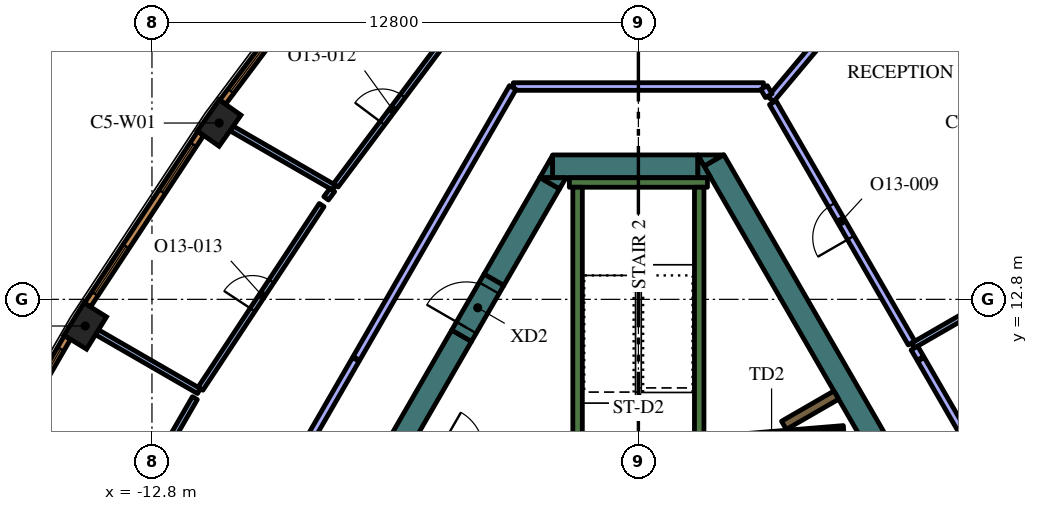
"""IFC4 building model, lengths in metres.
Left out: names, types, materials, properties, quantities, classifications, styles, units other than length and angle.
Written with IfcOpenShell. Run it as: python <this file> out.ifc"""

import sys

from ifc_helpers import new_model, si_unit, direction, frame, frame_2d, origin, origin_2d, place, context, subcontext, project, spatial, polyline, rectangle, outline, extrude, element, fill, save


model = new_model("IFC4")
c1 = context("Model", 3, precision=1e-05, world=origin(), true_north=direction((0.0, 1.0)))
c2 = subcontext(c1, "Body", "Model", "MODEL_VIEW")
j1 = project(units=[si_unit("LENGTHUNIT", "METRE"), si_unit("PLANEANGLEUNIT", "RADIAN")], contexts=[c1])
p1 = place(None, origin())
s1 = spatial("IfcSite", under=j1, at=p1, CompositionType="ELEMENT")
p2 = place(p1, origin())
s2 = spatial("IfcBuilding", under=s1, at=p2, CompositionType="ELEMENT")
p3 = place(p2, frame((0.0, 0.0, 292.2)))
s3 = spatial("IfcBuildingStorey", under=s2, at=p3, CompositionType="ELEMENT", Elevation=292.2)
for number, where, z_axis, x_axis in (
    (1, (-11.032, 17.44, 0.0), (0.0, 0.0, 1.0), (-0.575, -0.818, 0.0)),
    (2, (-14.556, 12.098, 0.0), (0.0, 0.0, 1.0), (-0.526, -0.851, 0.0)),
):
    element("IfcColumn", number, at=place(p3, frame(where, z_axis=z_axis, x_axis=x_axis)), inside=s3, PredefinedType="COLUMN", context=c2, shape_type="SweptSolid", body=[
        extrude(rectangle(XDim=1.0, YDim=0.7, at=origin_2d()), origin(), (0.0, 0.0, 1.0), 4.2),
    ])
p4 = place(p3, frame((1.989, 16.456, 0.0), z_axis=(0.0, 0.0, 1.0), x_axis=(0.49999102663, -0.8660305845, 0.0)))
e3 = element("IfcWall", 3, at=p4, inside=s3, PredefinedType="SOLIDWALL", context=c2, shape_type="SweptSolid", body=[
    extrude(rectangle(XDim=12.406, YDim=0.6, at=frame_2d((6.203, 0.0))), origin(), (0.0, 0.0, 1.0), 4.2),
])
p5 = place(p3, origin())
e4 = element("IfcWall", 4, at=p5, inside=s3, PredefinedType="SOLIDWALL", context=c2, shape_type="SweptSolid", body=[
    extrude(outline(polyline([(1.559, 16.6), (2.235, 16.6), (1.728, 16.307), (1.559, 16.6)])), origin(), (0.0, 0.0, 1.0), 4.2),
])
p6 = place(p3, frame((-2.258, 16.3, 0.0), z_axis=(0.0, 0.0, 1.0), x_axis=(1.0, 0.0, 0.0)))
e5 = element("IfcWall", 5, at=p6, inside=s3, PredefinedType="SOLIDWALL", context=c2, shape_type="SweptSolid", body=[
    extrude(rectangle(XDim=3.823, YDim=0.6, at=frame_2d((1.912, 0.0))), origin(), (0.0, 0.0, 1.0), 4.2),
])
e6 = element("IfcWall", 6, at=p5, inside=s3, PredefinedType="SOLIDWALL", context=c2, shape_type="SweptSolid", body=[
    extrude(outline(polyline([(1.905, 16.0), (1.567, 16.0), (1.567, 16.585), (1.905, 16.0)])), origin(), (0.0, 0.0, 1.0), 4.2),
])
e7 = element("IfcWall", 7, at=p5, inside=s3, PredefinedType="SOLIDWALL", context=c2, shape_type="SweptSolid", body=[
    extrude(outline(polyline([(-2.598, 16.0), (-2.26, 16.585), (-2.26, 16.0), (-2.598, 16.0)])), origin(), (0.0, 0.0, 1.0), 4.2),
])
p7 = place(p3, frame((-2.335, 15.855, 0.0), z_axis=(0.0, 0.0, 1.0), x_axis=(-0.499960127962, -0.866048422692, 0.0)))
e8 = element("IfcWall", 8, at=p7, inside=s3, PredefinedType="SOLIDWALL", context=c2, shape_type="SweptSolid", body=[
    extrude(rectangle(XDim=2.934, YDim=0.6, at=frame_2d((1.467, 0.0))), origin(), (0.0, 0.0, 1.0), 4.2),
])
e9 = element("IfcWall", 9, at=p5, inside=s3, PredefinedType="SOLIDWALL", context=c2, shape_type="SweptSolid", body=[
    extrude(outline(polyline([(-1.905, 16.0), (-2.074, 15.707), (-2.581, 16.0), (-1.905, 16.0)])), origin(), (0.0, 0.0, 1.0), 4.2),
])
e10 = element("IfcWall", 10, at=p5, inside=s3, PredefinedType="SOLIDWALL", context=c2, shape_type="SweptSolid", body=[
    extrude(outline(polyline([(-15.502, -6.35), (-4.912, 11.992), (-4.393, 11.692), (-10.815, 0.569), (-10.84, 0.583), (-10.84, 0.583), (-10.84, 0.583), (-10.965, 0.367), (-10.965, 0.367), (-10.965, 0.367), (-10.94, 0.352), (-11.033, 0.191), (-14.809, -6.35), (-15.156, -6.95), (-15.502, -6.35)])), origin(), (0.0, 0.0, 1.0), 4.2),
])
p8 = place(p3, frame((-1.817, 15.875, 0.0), z_axis=(0.0, 0.0, 1.0), x_axis=(1.0, 0.0, 0.0)))
e11 = element("IfcWall", 11, at=p8, inside=s3, PredefinedType="SOLIDWALL", context=c2, shape_type="SweptSolid", body=[
    extrude(rectangle(XDim=3.634, YDim=0.25, at=frame_2d((1.817, 0.0))), origin(), (0.0, 0.0, 1.0), 4.2),
])
p9 = place(p3, frame((1.6, 8.95, 0.0), z_axis=(0.0, 0.0, 1.0), x_axis=(0.0, 1.0, 0.0)))
e12 = element("IfcWall", 12, at=p9, inside=s3, PredefinedType="SOLIDWALL", context=c2, shape_type="SweptSolid", body=[
    extrude(rectangle(XDim=6.8, YDim=0.25, at=frame_2d((3.4, 0.0))), origin(), (0.0, 0.0, 1.0), 4.2),
])
p10 = place(p3, frame((-1.6, 8.7, 0.0), z_axis=(0.0, 0.0, 1.0), x_axis=(0.0, 1.0, 0.0)))
e13 = element("IfcWall", 13, at=p10, inside=s3, PredefinedType="SOLIDWALL", context=c2, shape_type="SweptSolid", body=[
    extrude(rectangle(XDim=7.05, YDim=0.25, at=frame_2d((3.525, 0.0))), origin(), (0.0, 0.0, 1.0), 4.2),
])
p11 = place(p3, frame((3.83, 9.486, 0.0), z_axis=(0.0, 0.0, 1.0), x_axis=(0.865986202621, 0.500067892261, 0.0)))
e14 = element("IfcWall", 14, at=p11, inside=s3, PredefinedType="SOLIDWALL", context=c2, shape_type="SweptSolid", body=[
    extrude(rectangle(XDim=1.591, YDim=0.25, at=frame_2d((0.795, 0.0))), origin(), (0.0, 0.0, 1.0), 4.2),
])
p12 = place(p3, frame((5.398, 9.419, 0.0), z_axis=(0.0, 0.0, 1.0), x_axis=(-0.996653416376, -0.081743303248, 0.0)))
e15 = element("IfcWall", 15, at=p12, inside=s3, PredefinedType="PARTITIONING", context=c2, shape_type="SweptSolid", body=[
    extrude(rectangle(XDim=2.7, YDim=0.12, at=frame_2d((1.35, 0.0))), origin(), (0.0, 0.0, 1.0), 3.55),
])
p13 = place(p12, frame((1.45, 0.0, 0.0)))
e16 = element("IfcOpeningElement", 16, at=p13, cuts=e15, PredefinedType="OPENING", context=c2, shape_type="SweptSolid", body=[
    extrude(rectangle(XDim=0.9, YDim=2.1, at=frame_2d((0.45, 1.05))), frame((0.0, 0.07, 0.0), z_axis=(0.0, -1.0, 0.0), x_axis=(1.0, 0.0, 0.0)), (0.0, 0.0, 1.0), 0.14),
])
p14 = place(p3, frame((-4.652, 11.842, 0.0), z_axis=(0.0, 0.0, 1.0), x_axis=(0.500062241894, 0.865989465428, 0.0)))
e17 = element("IfcWall", 17, at=p14, inside=s3, PredefinedType="SOLIDWALL", context=c2, shape_type="SweptSolid", body=[
    extrude(rectangle(XDim=1.7, YDim=0.6, at=frame_2d((0.85, 0.0))), origin(), (0.0, 0.0, 1.0), 4.2),
])
p15 = place(p14, frame((0.25, 0.0, 0.0)))
e18 = element("IfcOpeningElement", 18, at=p15, cuts=e17, PredefinedType="OPENING", context=c2, shape_type="SweptSolid", body=[
    extrude(rectangle(XDim=1.2, YDim=2.1, at=frame_2d((0.6, 1.05))), frame((0.0, 0.31, 0.0), z_axis=(0.0, -1.0, 0.0), x_axis=(1.0, 0.0, 0.0)), (0.0, 0.0, 1.0), 0.62),
])
p16 = place(p3, frame((7.226, 11.585, 0.0), z_axis=(0.0, 0.0, 1.0), x_axis=(0.866021079084, 0.500007490527, 0.0)))
e19 = element("IfcWall", 19, at=p16, inside=s3, PredefinedType="PARTITIONING", context=c2, shape_type="SweptSolid", body=[
    extrude(rectangle(XDim=2.892, YDim=0.15, at=frame_2d((1.446, 0.0))), origin(), (0.0, 0.0, 1.0), 3.55),
])
p17 = place(p3, frame((13.436, 0.829, 0.0), z_axis=(0.0, 0.0, 1.0), x_axis=(-0.49999894854, 0.866026010844, 0.0)))
e20 = element("IfcWall", 20, at=p17, inside=s3, PredefinedType="PARTITIONING", context=c2, shape_type="SweptSolid", body=[
    extrude(rectangle(XDim=12.0, YDim=0.2, at=frame_2d((6.0, 0.0))), origin(), (0.0, 0.0, 1.0), 3.55),
])
p18 = place(p17, frame((5.5, 0.0, 0.0)))
e21 = element("IfcOpeningElement", 21, at=p18, cuts=e20, PredefinedType="OPENING", context=c2, shape_type="SweptSolid", body=[
    extrude(rectangle(XDim=1.0, YDim=2.1, at=frame_2d((0.5, 1.05))), frame((0.0, 0.11, 0.0), z_axis=(0.0, -1.0, 0.0), x_axis=(1.0, 0.0, 0.0)), (0.0, 0.0, 1.0), 0.22),
])
p19 = place(p3, frame((7.421, 11.247, 0.0), z_axis=(0.0, 0.0, 1.0), x_axis=(-0.500303403544, 0.865850162789, 0.0)))
e22 = element("IfcWall", 22, at=p19, inside=s3, PredefinedType="PARTITIONING", context=c2, shape_type="SweptSolid", body=[
    extrude(rectangle(XDim=0.315, YDim=0.2, at=frame_2d((0.158, 0.0))), origin(), (0.0, 0.0, 1.0), 3.55),
])
p20 = place(p3, frame((3.483, 18.067, 0.0), z_axis=(0.0, 0.0, 1.0), x_axis=(0.642896944312, 0.765952687177, 0.0)))
e23 = element("IfcWall", 23, at=p20, inside=s3, PredefinedType="PARTITIONING", context=c2, shape_type="SweptSolid", body=[
    extrude(rectangle(XDim=2.29, YDim=0.2, at=frame_2d((1.145, 0.0))), origin(), (0.0, 0.0, 1.0), 3.55),
])
p21 = place(p3, frame((7.188, 11.65, 0.0), z_axis=(0.0, 0.0, 1.0), x_axis=(-0.499989634868, 0.866031388014, 0.0)))
e24 = element("IfcWall", 24, at=p21, inside=s3, PredefinedType="PARTITIONING", context=c2, shape_type="SweptSolid", body=[
    extrude(rectangle(XDim=7.303, YDim=0.2, at=frame_2d((3.652, 0.0))), origin(), (0.0, 0.0, 1.0), 3.55),
])
p22 = place(p21, frame((3.2, 0.0, 0.0)))
e25 = element("IfcOpeningElement", 25, at=p22, cuts=e24, PredefinedType="OPENING", context=c2, shape_type="SweptSolid", body=[
    extrude(rectangle(XDim=1.0, YDim=2.1, at=frame_2d((0.5, 1.05))), frame((0.0, 0.11, 0.0), z_axis=(0.0, -1.0, 0.0), x_axis=(1.0, 0.0, 0.0)), (0.0, 0.0, 1.0), 0.22),
])
p23 = place(p3, frame((-8.007, 15.74, 0.0), z_axis=(0.0, 0.0, 1.0), x_axis=(-0.866044607523, 0.499966736674, 0.0)))
e26 = element("IfcWall", 26, at=p23, inside=s3, PredefinedType="PARTITIONING", context=c2, shape_type="SweptSolid", body=[
    extrude(rectangle(XDim=3.115, YDim=0.15, at=frame_2d((1.557, 0.0))), origin(), (0.0, 0.0, 1.0), 3.55),
])
p24 = place(p3, frame((-7.962, 15.8, 0.0), z_axis=(0.0, 0.0, 1.0), x_axis=(0.599541489613, 0.800343677574, 0.0)))
e27 = element("IfcWall", 27, at=p24, inside=s3, PredefinedType="PARTITIONING", context=c2, shape_type="SweptSolid", body=[
    extrude(rectangle(XDim=4.942, YDim=0.15, at=frame_2d((2.471, 0.0))), origin(), (0.0, 0.0, 1.0), 3.55),
])
p25 = place(p24, frame((2.042, 0.0, 0.0)))
e28 = element("IfcOpeningElement", 28, at=p25, cuts=e27, PredefinedType="OPENING", context=c2, shape_type="SweptSolid", body=[
    extrude(rectangle(XDim=0.9, YDim=2.1, at=frame_2d((0.45, 1.05))), frame((0.0, 0.085, 0.0), z_axis=(0.0, -1.0, 0.0), x_axis=(1.0, 0.0, 0.0)), (0.0, 0.0, 1.0), 0.17),
])
p26 = place(p3, frame((-11.564, 10.387, 0.0), z_axis=(0.0, 0.0, 1.0), x_axis=(-0.86604641216, 0.499963610661, 0.0)))
e29 = element("IfcWall", 29, at=p26, inside=s3, PredefinedType="PARTITIONING", context=c2, shape_type="SweptSolid", body=[
    extrude(rectangle(XDim=3.096, YDim=0.15, at=frame_2d((1.548, 0.0))), origin(), (0.0, 0.0, 1.0), 3.55),
])
p27 = place(p3, frame((-8.052, 15.679, 0.0), z_axis=(0.0, 0.0, 1.0), x_axis=(-0.599004157744, -0.800745914136, 0.0)))
e30 = element("IfcWall", 30, at=p27, inside=s3, PredefinedType="PARTITIONING", context=c2, shape_type="SweptSolid", body=[
    extrude(rectangle(XDim=0.275, YDim=0.15, at=frame_2d((0.137, 0.0))), origin(), (0.0, 0.0, 1.0), 3.55),
])
p28 = place(p3, frame((-11.523, 10.449, 0.0), z_axis=(0.0, 0.0, 1.0), x_axis=(0.550751709023, 0.834669129061, 0.0)))
e31 = element("IfcWall", 31, at=p28, inside=s3, PredefinedType="PARTITIONING", context=c2, shape_type="SweptSolid", body=[
    extrude(rectangle(XDim=5.788, YDim=0.15, at=frame_2d((2.894, 0.0))), origin(), (0.0, 0.0, 1.0), 3.55),
])
p29 = place(p28, frame((2.488, 0.0, 0.0)))
e32 = element("IfcOpeningElement", 32, at=p29, cuts=e31, PredefinedType="OPENING", context=c2, shape_type="SweptSolid", body=[
    extrude(rectangle(XDim=0.9, YDim=2.1, at=frame_2d((0.45, 1.05))), frame((0.0, 0.085, 0.0), z_axis=(0.0, -1.0, 0.0), x_axis=(1.0, 0.0, 0.0)), (0.0, 0.0, 1.0), 0.17),
])
p30 = place(p3, frame((-14.74, 4.887, 0.0), z_axis=(0.0, 0.0, 1.0), x_axis=(0.500007141444, 0.86602128063, 0.0)))
e33 = element("IfcWall", 33, at=p30, inside=s3, PredefinedType="PARTITIONING", context=c2, shape_type="SweptSolid", body=[
    extrude(rectangle(XDim=6.137, YDim=0.15, at=frame_2d((3.068, 0.0))), origin(), (0.0, 0.0, 1.0), 3.55),
])
p31 = place(p30, frame((2.637, 0.0, 0.0)))
e34 = element("IfcOpeningElement", 34, at=p31, cuts=e33, PredefinedType="OPENING", context=c2, shape_type="SweptSolid", body=[
    extrude(rectangle(XDim=0.9, YDim=2.1, at=frame_2d((0.45, 1.05))), frame((0.0, 0.085, 0.0), z_axis=(0.0, -1.0, 0.0), x_axis=(1.0, 0.0, 0.0)), (0.0, 0.0, 1.0), 0.17),
])
p32 = place(p3, frame((-7.436, 11.221, 0.0), z_axis=(0.0, 0.0, 1.0), x_axis=(-0.49999894854, -0.866026010844, 0.0)))
e35 = element("IfcWall", 35, at=p32, inside=s3, PredefinedType="PARTITIONING", context=c2, shape_type="SweptSolid", body=[
    extrude(rectangle(XDim=12.0, YDim=0.2, at=frame_2d((6.0, 0.0))), origin(), (0.0, 0.0, 1.0), 3.55),
])
p33 = place(p32, frame((5.5, 0.0, 0.0)))
e36 = element("IfcOpeningElement", 36, at=p33, cuts=e35, PredefinedType="OPENING", context=c2, shape_type="SweptSolid", body=[
    extrude(rectangle(XDim=1.0, YDim=2.1, at=frame_2d((0.5, 1.05))), frame((0.0, 0.11, 0.0), z_axis=(0.0, -1.0, 0.0), x_axis=(1.0, 0.0, 0.0)), (0.0, 0.0, 1.0), 0.22),
])
p34 = place(p3, frame((3.291, 18.4, 0.0), z_axis=(0.0, 0.0, 1.0), x_axis=(-1.0, 0.0, 0.0)))
e37 = element("IfcWall", 37, at=p34, inside=s3, PredefinedType="PARTITIONING", context=c2, shape_type="SweptSolid", body=[
    extrude(rectangle(XDim=6.582, YDim=0.2, at=frame_2d((3.291, 0.0))), origin(), (0.0, 0.0, 1.0), 3.55),
])
p35 = place(p3, frame((-3.306, 18.374, 0.0), z_axis=(0.0, 0.0, 1.0), x_axis=(-0.499999798456, -0.866025520146, 0.0)))
e38 = element("IfcWall", 38, at=p35, inside=s3, PredefinedType="PARTITIONING", context=c2, shape_type="SweptSolid", body=[
    extrude(rectangle(XDim=8.229, YDim=0.2, at=frame_2d((4.115, 0.0))), origin(), (0.0, 0.0, 1.0), 3.55),
])
p36 = place(p3, frame((3.43, 18.159, 0.0), z_axis=(0.0, 0.0, 1.0), x_axis=(-0.499949632511, 0.866054481515, 0.0)))
e39 = element("IfcWall", 39, at=p36, inside=s3, PredefinedType="PARTITIONING", context=c2, shape_type="SweptSolid", body=[
    extrude(rectangle(XDim=0.248, YDim=0.2, at=frame_2d((0.124, 0.0))), origin(), (0.0, 0.0, 1.0), 3.55),
])
p37 = place(p3, frame((10.938, 17.99, 0.0), z_axis=(0.0, 0.0, 1.0), x_axis=(-0.599559865294, 0.800329911929, 0.0)))
e40 = element("IfcWall", 40, at=p37, inside=s3, PredefinedType="SOLIDWALL", context=c2, shape_type="SweptSolid", body=[
    extrude(rectangle(XDim=5.415, YDim=0.19, at=frame_2d((2.708, 0.0))), origin(), (0.0, 0.0, 1.0), 3.95),
])
p38 = place(p37, frame((0.358, 0.0, 0.6)))
e41 = element("IfcOpeningElement", 41, at=p38, cuts=e40, PredefinedType="OPENING", context=c2, shape_type="SweptSolid", body=[
    extrude(rectangle(XDim=1.5, YDim=2.85, at=frame_2d((0.75, 1.425))), frame((0.0, 0.105, 0.0), z_axis=(0.0, -1.0, 0.0), x_axis=(1.0, 0.0, 0.0)), (0.0, 0.0, 1.0), 0.21),
])
p39 = place(p37, frame((3.593, 0.0, 0.6)))
e42 = element("IfcOpeningElement", 42, at=p39, cuts=e40, PredefinedType="OPENING", context=c2, shape_type="SweptSolid", body=[
    extrude(rectangle(XDim=1.5, YDim=2.85, at=frame_2d((0.75, 1.425))), frame((0.0, 0.105, 0.0), z_axis=(0.0, -1.0, 0.0), x_axis=(1.0, 0.0, 0.0)), (0.0, 0.0, 1.0), 0.21),
])
p40 = place(p3, frame((-7.692, 22.324, 0.0), z_axis=(0.0, 0.0, 1.0), x_axis=(-0.599559865294, -0.800329911929, 0.0)))
e43 = element("IfcWall", 43, at=p40, inside=s3, PredefinedType="SOLIDWALL", context=c2, shape_type="SweptSolid", body=[
    extrude(rectangle(XDim=5.415, YDim=0.19, at=frame_2d((2.708, 0.0))), origin(), (0.0, 0.0, 1.0), 3.95),
])
p41 = place(p40, frame((0.323, 0.0, 0.6)))
e44 = element("IfcOpeningElement", 44, at=p41, cuts=e43, PredefinedType="OPENING", context=c2, shape_type="SweptSolid", body=[
    extrude(rectangle(XDim=1.5, YDim=2.85, at=frame_2d((0.75, 1.425))), frame((0.0, 0.105, 0.0), z_axis=(0.0, -1.0, 0.0), x_axis=(1.0, 0.0, 0.0)), (0.0, 0.0, 1.0), 0.21),
])
p42 = place(p40, frame((3.558, 0.0, 0.6)))
e45 = element("IfcOpeningElement", 45, at=p42, cuts=e43, PredefinedType="OPENING", context=c2, shape_type="SweptSolid", body=[
    extrude(rectangle(XDim=1.5, YDim=2.85, at=frame_2d((0.75, 1.425))), frame((0.0, 0.105, 0.0), z_axis=(0.0, -1.0, 0.0), x_axis=(1.0, 0.0, 0.0)), (0.0, 0.0, 1.0), 0.21),
])
p43 = place(p3, frame((-11.518, 17.166, 0.0), z_axis=(0.0, 0.0, 1.0), x_axis=(-0.550744054781, -0.83467417962, 0.0)))
e46 = element("IfcWall", 46, at=p43, inside=s3, PredefinedType="SOLIDWALL", context=c2, shape_type="SweptSolid", body=[
    extrude(rectangle(XDim=5.406, YDim=0.19, at=frame_2d((2.703, 0.0))), origin(), (0.0, 0.0, 1.0), 3.95),
])
p44 = place(p43, frame((0.346, 0.0, 0.6)))
e47 = element("IfcOpeningElement", 47, at=p44, cuts=e46, PredefinedType="OPENING", context=c2, shape_type="SweptSolid", body=[
    extrude(rectangle(XDim=1.5, YDim=2.85, at=frame_2d((0.75, 1.425))), frame((0.0, 0.105, 0.0), z_axis=(0.0, -1.0, 0.0), x_axis=(1.0, 0.0, 0.0)), (0.0, 0.0, 1.0), 0.21),
])
p45 = place(p43, frame((3.559, 0.0, 0.6)))
e48 = element("IfcOpeningElement", 48, at=p45, cuts=e46, PredefinedType="OPENING", context=c2, shape_type="SweptSolid", body=[
    extrude(rectangle(XDim=1.5, YDim=2.85, at=frame_2d((0.75, 1.425))), frame((0.0, 0.105, 0.0), z_axis=(0.0, -1.0, 0.0), x_axis=(1.0, 0.0, 0.0)), (0.0, 0.0, 1.0), 0.21),
])
p46 = place(p3, frame((-15.025, 11.796, 0.0), z_axis=(0.0, 0.0, 1.0), x_axis=(-0.500024767483, -0.866011103799, 0.0)))
e49 = element("IfcWall", 49, at=p46, inside=s3, PredefinedType="SOLIDWALL", context=c2, shape_type="SweptSolid", body=[
    extrude(rectangle(XDim=5.406, YDim=0.19, at=frame_2d((2.703, 0.0))), origin(), (0.0, 0.0, 1.0), 3.95),
])
p47 = place(p46, frame((0.346, 0.0, 0.6)))
e50 = element("IfcOpeningElement", 50, at=p47, cuts=e49, PredefinedType="OPENING", context=c2, shape_type="SweptSolid", body=[
    extrude(rectangle(XDim=1.5, YDim=2.85, at=frame_2d((0.75, 1.425))), frame((0.0, 0.105, 0.0), z_axis=(0.0, -1.0, 0.0), x_axis=(1.0, 0.0, 0.0)), (0.0, 0.0, 1.0), 0.21),
])
p48 = place(p46, frame((3.559, 0.0, 0.6)))
e51 = element("IfcOpeningElement", 51, at=p48, cuts=e49, PredefinedType="OPENING", context=c2, shape_type="SweptSolid", body=[
    extrude(rectangle(XDim=1.5, YDim=2.85, at=frame_2d((0.75, 1.425))), frame((0.0, 0.105, 0.0), z_axis=(0.0, -1.0, 0.0), x_axis=(1.0, 0.0, 0.0)), (0.0, 0.0, 1.0), 0.21),
])
p49 = place(p13, origin())
e52 = element("IfcDoor", 52, at=p49, inside=s3, OperationType="SINGLE_SWING_LEFT", PredefinedType="DOOR", context=c2, shape_type="SweptSolid", body=[
    extrude(rectangle(XDim=0.9, YDim=2.1, at=frame_2d((0.45, 1.05))), frame((0.0, 0.025, 0.0), z_axis=(0.0, -1.0, 0.0), x_axis=(1.0, 0.0, 0.0)), (0.0, 0.0, 1.0), 0.05),
])
fill(e16, e52)
p50 = place(p15, origin())
e53 = element("IfcDoor", 53, at=p50, inside=s3, OperationType="SINGLE_SWING_LEFT", PredefinedType="DOOR", context=c2, shape_type="SweptSolid", body=[
    extrude(rectangle(XDim=1.2, YDim=2.1, at=frame_2d((0.6, 1.05))), frame((0.0, 0.025, 0.0), z_axis=(0.0, -1.0, 0.0), x_axis=(1.0, 0.0, 0.0)), (0.0, 0.0, 1.0), 0.05),
])
fill(e18, e53)
p51 = place(p22, origin())
e54 = element("IfcDoor", 54, at=p51, inside=s3, OperationType="SINGLE_SWING_RIGHT", PredefinedType="DOOR", context=c2, shape_type="SweptSolid", body=[
    extrude(rectangle(XDim=1.0, YDim=2.1, at=frame_2d((0.5, 1.05))), frame((0.0, 0.025, 0.0), z_axis=(0.0, -1.0, 0.0), x_axis=(1.0, 0.0, 0.0)), (0.0, 0.0, 1.0), 0.05),
])
fill(e25, e54)
p52 = place(p25, origin())
e55 = element("IfcDoor", 55, at=p52, inside=s3, OperationType="SINGLE_SWING_RIGHT", PredefinedType="DOOR", context=c2, shape_type="SweptSolid", body=[
    extrude(rectangle(XDim=0.9, YDim=2.1, at=frame_2d((0.45, 1.05))), frame((0.0, 0.025, 0.0), z_axis=(0.0, -1.0, 0.0), x_axis=(1.0, 0.0, 0.0)), (0.0, 0.0, 1.0), 0.05),
])
fill(e28, e55)
p53 = place(p29, origin())
e56 = element("IfcDoor", 56, at=p53, inside=s3, OperationType="SINGLE_SWING_RIGHT", PredefinedType="DOOR", context=c2, shape_type="SweptSolid", body=[
    extrude(rectangle(XDim=0.9, YDim=2.1, at=frame_2d((0.45, 1.05))), frame((0.0, 0.025, 0.0), z_axis=(0.0, -1.0, 0.0), x_axis=(1.0, 0.0, 0.0)), (0.0, 0.0, 1.0), 0.05),
])
fill(e32, e56)
p54 = place(p42, origin())
e57 = element("IfcWindow", 57, at=p54, inside=s3, PartitioningType="SINGLE_PANEL", PredefinedType="WINDOW", context=c2, shape_type="SweptSolid", body=[
    extrude(rectangle(XDim=1.5, YDim=2.85, at=frame_2d((0.75, 1.425))), frame((0.0, 0.045, 0.0), z_axis=(0.0, -1.0, 0.0), x_axis=(1.0, 0.0, 0.0)), (0.0, 0.0, 1.0), 0.06),
])
fill(e45, e57)
p55 = place(p44, origin())
e58 = element("IfcWindow", 58, at=p55, inside=s3, PartitioningType="SINGLE_PANEL", PredefinedType="WINDOW", context=c2, shape_type="SweptSolid", body=[
    extrude(rectangle(XDim=1.5, YDim=2.85, at=frame_2d((0.75, 1.425))), frame((0.0, 0.045, 0.0), z_axis=(0.0, -1.0, 0.0), x_axis=(1.0, 0.0, 0.0)), (0.0, 0.0, 1.0), 0.06),
])
fill(e47, e58)
p56 = place(p45, origin())
e59 = element("IfcWindow", 59, at=p56, inside=s3, PartitioningType="SINGLE_PANEL", PredefinedType="WINDOW", context=c2, shape_type="SweptSolid", body=[
    extrude(rectangle(XDim=1.5, YDim=2.85, at=frame_2d((0.75, 1.425))), frame((0.0, 0.045, 0.0), z_axis=(0.0, -1.0, 0.0), x_axis=(1.0, 0.0, 0.0)), (0.0, 0.0, 1.0), 0.06),
])
fill(e48, e59)
p57 = place(p47, origin())
e60 = element("IfcWindow", 60, at=p57, inside=s3, PartitioningType="SINGLE_PANEL", PredefinedType="WINDOW", context=c2, shape_type="SweptSolid", body=[
    extrude(rectangle(XDim=1.5, YDim=2.85, at=frame_2d((0.75, 1.425))), frame((0.0, 0.045, 0.0), z_axis=(0.0, -1.0, 0.0), x_axis=(1.0, 0.0, 0.0)), (0.0, 0.0, 1.0), 0.06),
])
fill(e50, e60)
save(model, sys.argv[1])
